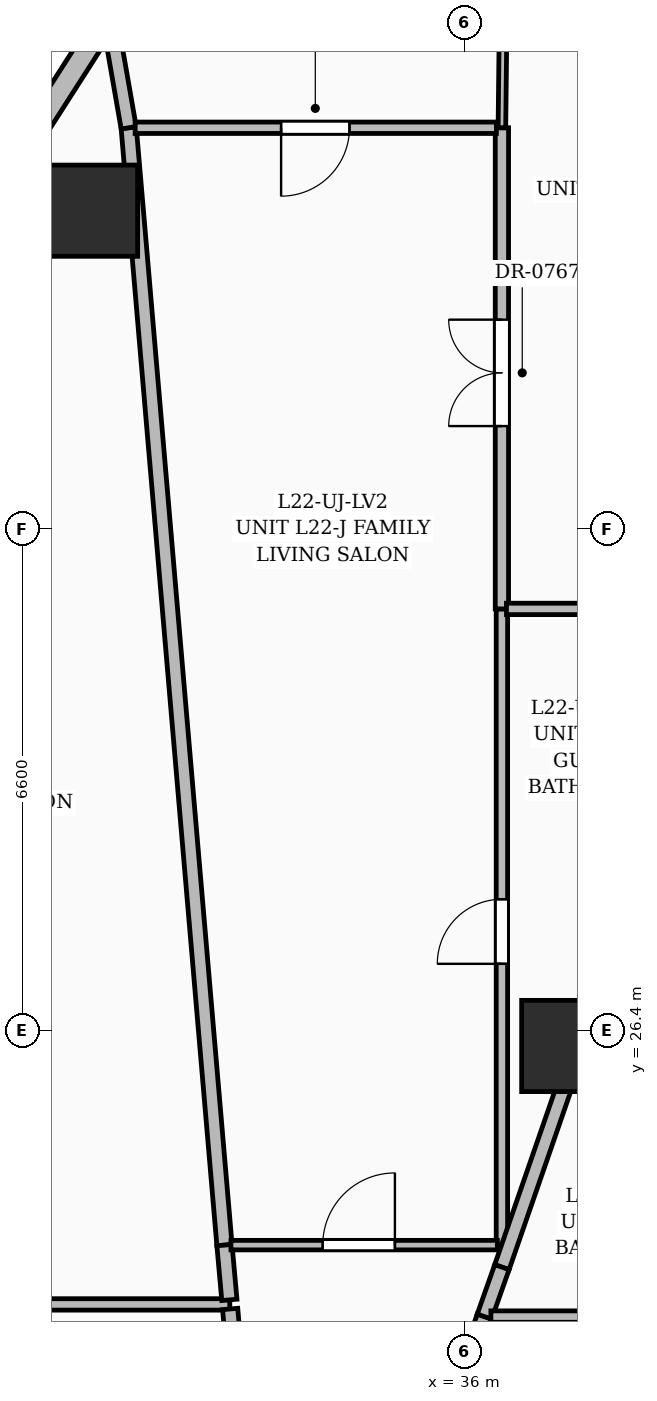
"""IFC4 building model, lengths in metres.
Left out: names, types, materials, properties, quantities, classifications, styles, units other than length and angle.
Written with IfcOpenShell. Run it as: python <this file> out.ifc"""

import sys

from ifc_helpers import new_model, si_unit, direction, frame, frame_2d, origin, origin_2d, place, context, subcontext, project, spatial, rectangle, extrude, element, fill, save


model = new_model("IFC4")
c1 = context("Model", 3, precision=1e-05, world=origin(), true_north=direction((0.0, 1.0)))
c2 = subcontext(c1, "Body", "Model", "MODEL_VIEW")
j1 = project(units=[si_unit("LENGTHUNIT", "METRE"), si_unit("PLANEANGLEUNIT", "RADIAN")], contexts=[c1])
p1 = place(None, origin())
s1 = spatial("IfcSite", under=j1, at=p1, CompositionType="ELEMENT")
p2 = place(p1, origin())
s2 = spatial("IfcBuilding", under=s1, at=p2, CompositionType="ELEMENT")
p3 = place(p2, frame((0.0, 0.0, 89.4)))
s3 = spatial("IfcBuildingStorey", under=s2, at=p3, CompositionType="ELEMENT", Elevation=89.4)
for number, where, z_axis, x_axis in (
    (1, (37.35, 26.2, 0.0), (0.0, 0.0, 1.0), (1.0, 0.0, 0.0)),
    (2, (31.098, 37.189, 0.0), (0.0, 0.0, 1.0), (1.0, 0.0, 0.0)),
):
    element("IfcColumn", number, at=place(p3, frame(where, z_axis=z_axis, x_axis=x_axis)), inside=s3, PredefinedType="COLUMN", context=c2, shape_type="SweptSolid", body=[
        extrude(rectangle(XDim=1.2, YDim=1.2, at=origin_2d()), origin(), (0.0, 0.0, 1.0), 3.6),
    ])
p4 = place(p3, frame((30.164, 37.954, 0.0), z_axis=(0.0, 0.0, 1.0), x_axis=(0.539473041718, 0.842002872477, 0.0)))
e3 = element("IfcWall", 3, at=p4, inside=s3, PredefinedType="SOLIDWALL", context=c2, shape_type="SweptSolid", body=[
    extrude(rectangle(XDim=6.872, YDim=0.3, at=frame_2d((3.436, 0.0))), origin(), (0.0, 0.0, 1.0), 3.35),
])
p5 = place(p4, frame((2.625, 0.0, 0.6)))
e4 = element("IfcOpeningElement", 4, at=p5, cuts=e3, PredefinedType="OPENING", context=c2, shape_type="SweptSolid", body=[
    extrude(rectangle(XDim=1.8, YDim=2.1, at=frame_2d((0.9, 1.05))), frame((0.0, 0.16, 0.0), z_axis=(0.0, -1.0, 0.0), x_axis=(1.0, 0.0, 0.0)), (0.0, 0.0, 1.0), 0.32),
])
p6 = place(p3, frame((32.91, 22.8, 0.0), z_axis=(0.0, 0.0, 1.0), x_axis=(-1.0, 0.0, 0.0)))
e5 = element("IfcWall", 5, at=p6, inside=s3, PredefinedType="PARTITIONING", context=c2, shape_type="SweptSolid", body=[
    extrude(rectangle(XDim=7.67, YDim=0.15, at=frame_2d((3.835, 0.0))), origin(), (0.0, 0.0, 1.0), 2.345),
])
p7 = place(p6, frame((3.449, 0.0, 0.0)))
e6 = element("IfcOpeningElement", 6, at=p7, cuts=e5, PredefinedType="OPENING", context=c2, shape_type="SweptSolid", body=[
    extrude(rectangle(XDim=0.95, YDim=2.2, at=frame_2d((0.475, 1.1))), frame((0.0, 0.085, 0.0), z_axis=(0.0, -1.0, 0.0), x_axis=(1.0, 0.0, 0.0)), (0.0, 0.0, 1.0), 0.17),
])
p8 = place(p3, frame((33.333, 17.835, 0.0), z_axis=(0.0, 0.0, 1.0), x_axis=(-0.08484696782, 0.996393994388, 0.0)))
e7 = element("IfcWall", 7, at=p8, inside=s3, PredefinedType="PARTITIONING", context=c2, shape_type="SweptSolid", body=[
    extrude(rectangle(XDim=4.923, YDim=0.2, at=frame_2d((2.462, 0.0))), origin(), (0.0, 0.0, 1.0), 2.345),
])
p9 = place(p3, frame((32.84, 23.58, 0.0), z_axis=(0.0, 0.0, 1.0), x_axis=(-0.085402080026, 0.996346568583, 0.0)))
e8 = element("IfcWall", 8, at=p9, inside=s3, PredefinedType="PARTITIONING", context=c2, shape_type="SweptSolid", body=[
    extrude(rectangle(XDim=14.754, YDim=0.2, at=frame_2d((7.377, 0.0))), origin(), (0.0, 0.0, 1.0), 2.345),
])
p10 = place(p3, frame((32.905, 22.86, 0.0), z_axis=(0.0, 0.0, 1.0), x_axis=(-0.089135306775, 0.996019526458, 0.0)))
e9 = element("IfcWall", 9, at=p10, inside=s3, PredefinedType="PARTITIONING", context=c2, shape_type="SweptSolid", body=[
    extrude(rectangle(XDim=0.723, YDim=0.2, at=frame_2d((0.362, 0.0))), origin(), (0.0, 0.0, 1.0), 3.35),
])
p11 = place(p3, frame((31.58, 38.28, 0.0), z_axis=(0.0, 0.0, 1.0), x_axis=(-0.172186828925, 0.985064310563, 0.0)))
e10 = element("IfcWall", 10, at=p11, inside=s3, PredefinedType="PARTITIONING", context=c2, shape_type="SweptSolid", body=[
    extrude(rectangle(XDim=1.255, YDim=0.2, at=frame_2d((0.627, 0.0))), origin(), (0.0, 0.0, 1.0), 3.35),
])
p12 = place(p3, frame((36.49, 23.58, 0.0), z_axis=(0.0, 0.0, 1.0), x_axis=(0.0, 1.0, 0.0)))
e11 = element("IfcWall", 11, at=p12, inside=s3, PredefinedType="PARTITIONING", context=c2, shape_type="SweptSolid", body=[
    extrude(rectangle(XDim=8.37, YDim=0.15, at=frame_2d((4.185, 0.0))), origin(), (0.0, 0.0, 1.0), 2.309),
])
p13 = place(p12, frame((3.701, 0.0, 0.0)))
e12 = element("IfcOpeningElement", 12, at=p13, cuts=e11, PredefinedType="OPENING", context=c2, shape_type="SweptSolid", body=[
    extrude(rectangle(XDim=0.85, YDim=2.1, at=frame_2d((0.425, 1.05))), frame((0.0, 0.085, 0.0), z_axis=(0.0, -1.0, 0.0), x_axis=(1.0, 0.0, 0.0)), (0.0, 0.0, 1.0), 0.17),
])
p14 = place(p3, frame((32.925, 23.58, 0.0), z_axis=(0.0, 0.0, 1.0), x_axis=(1.0, 0.0, 0.0)))
e13 = element("IfcWall", 13, at=p14, inside=s3, PredefinedType="PARTITIONING", context=c2, shape_type="SweptSolid", body=[
    extrude(rectangle(XDim=3.505, YDim=0.125, at=frame_2d((1.752, 0.0))), origin(), (0.0, 0.0, 1.0), 2.309),
])
p15 = place(p14, frame((1.208, 0.0, 0.0)))
e14 = element("IfcOpeningElement", 14, at=p15, cuts=e13, PredefinedType="OPENING", context=c2, shape_type="SweptSolid", body=[
    extrude(rectangle(XDim=0.95, YDim=2.2, at=frame_2d((0.475, 1.1))), frame((0.0, 0.072, 0.0), z_axis=(0.0, -1.0, 0.0), x_axis=(1.0, 0.0, 0.0)), (0.0, 0.0, 1.0), 0.145),
])
p16 = place(p3, frame((36.49, 31.95, 0.0), z_axis=(0.0, 0.0, 1.0), x_axis=(0.0, 1.0, 0.0)))
e15 = element("IfcWall", 15, at=p16, inside=s3, PredefinedType="PARTITIONING", context=c2, shape_type="SweptSolid", body=[
    extrude(rectangle(XDim=6.33, YDim=0.175, at=frame_2d((3.165, 0.0))), origin(), (0.0, 0.0, 1.0), 2.37),
])
p17 = place(p16, frame((2.406, 0.0, 0.0)))
e16 = element("IfcOpeningElement", 16, at=p17, cuts=e15, PredefinedType="OPENING", context=c2, shape_type="SweptSolid", body=[
    extrude(rectangle(XDim=1.4, YDim=2.2, at=frame_2d((0.7, 1.1))), frame((0.0, 0.097, 0.0), z_axis=(0.0, -1.0, 0.0), x_axis=(1.0, 0.0, 0.0)), (0.0, 0.0, 1.0), 0.195),
])
p18 = place(p3, frame((36.417, 38.28, 0.0), z_axis=(0.0, 0.0, 1.0), x_axis=(-1.0, 0.0, 0.0)))
e17 = element("IfcWall", 17, at=p18, inside=s3, PredefinedType="PARTITIONING", context=c2, shape_type="SweptSolid", body=[
    extrude(rectangle(XDim=4.752, YDim=0.15, at=frame_2d((2.376, 0.0))), origin(), (0.0, 0.0, 1.0), 3.35),
])
p19 = place(p18, frame((1.933, 0.0, 0.0)))
e18 = element("IfcOpeningElement", 18, at=p19, cuts=e17, PredefinedType="OPENING", context=c2, shape_type="SweptSolid", body=[
    extrude(rectangle(XDim=0.9, YDim=2.15, at=frame_2d((0.45, 1.075))), frame((0.0, 0.085, 0.0), z_axis=(0.0, -1.0, 0.0), x_axis=(1.0, 0.0, 0.0)), (0.0, 0.0, 1.0), 0.17),
])
p20 = place(p3, frame((39.49, 31.95, 0.0), z_axis=(0.0, 0.0, 1.0), x_axis=(-1.0, 0.0, 0.0)))
e19 = element("IfcWall", 19, at=p20, inside=s3, PredefinedType="PARTITIONING", context=c2, shape_type="SweptSolid", body=[
    extrude(rectangle(XDim=2.94, YDim=0.15, at=frame_2d((1.47, 0.0))), origin(), (0.0, 0.0, 1.0), 3.35),
])
p21 = place(p20, frame((1.075, 0.0, 0.0)))
e20 = element("IfcOpeningElement", 20, at=p21, cuts=e19, PredefinedType="OPENING", context=c2, shape_type="SweptSolid", body=[
    extrude(rectangle(XDim=0.85, YDim=2.1, at=frame_2d((0.425, 1.05))), frame((0.0, 0.085, 0.0), z_axis=(0.0, -1.0, 0.0), x_axis=(1.0, 0.0, 0.0)), (0.0, 0.0, 1.0), 0.17),
])
p22 = place(p3, frame((36.49, 23.29, 0.0), z_axis=(0.0, 0.0, 1.0), x_axis=(0.326948466607, 0.945042168468, 0.0)))
e21 = element("IfcWall", 21, at=p22, inside=s3, PredefinedType="PARTITIONING", context=c2, shape_type="SweptSolid", body=[
    extrude(rectangle(XDim=8.381, YDim=0.2, at=frame_2d((4.19, 0.0))), origin(), (0.0, 0.0, 1.0), 2.309),
])
p23 = place(p3, frame((34.598, 17.83, 0.0), z_axis=(0.0, 0.0, 1.0), x_axis=(0.326629354312, 0.945152508806, 0.0)))
e22 = element("IfcWall", 22, at=p23, inside=s3, PredefinedType="PARTITIONING", context=c2, shape_type="SweptSolid", body=[
    extrude(rectangle(XDim=5.089, YDim=0.2, at=frame_2d((2.544, 0.0))), origin(), (0.0, 0.0, 1.0), 3.35),
])
p24 = place(p23, frame((1.943, 0.0, 0.0)))
e23 = element("IfcOpeningElement", 23, at=p24, cuts=e22, PredefinedType="OPENING", context=c2, shape_type="SweptSolid", body=[
    extrude(rectangle(XDim=1.0, YDim=2.2, at=frame_2d((0.5, 1.1))), frame((0.0, 0.11, 0.0), z_axis=(0.0, -1.0, 0.0), x_axis=(1.0, 0.0, 0.0)), (0.0, 0.0, 1.0), 0.22),
])
p25 = place(p3, frame((36.26, 22.64, 0.0), z_axis=(0.0, 0.0, 1.0), x_axis=(0.333486681142, 0.942754810914, 0.0)))
e24 = element("IfcWall", 24, at=p25, inside=s3, PredefinedType="PARTITIONING", context=c2, shape_type="SweptSolid", body=[
    extrude(rectangle(XDim=0.69, YDim=0.2, at=frame_2d((0.345, 0.0))), origin(), (0.0, 0.0, 1.0), 3.35),
])
p26 = place(p3, frame((36.523, 41.154, 0.0), z_axis=(0.0, 0.0, 1.0), x_axis=(-0.011467135897, -0.999934250236, 0.0)))
e25 = element("IfcWall", 25, at=p26, inside=s3, PredefinedType="PARTITIONING", context=c2, shape_type="SweptSolid", body=[
    extrude(rectangle(XDim=2.874, YDim=0.1, at=frame_2d((1.437, 0.0))), origin(), (0.0, 0.0, 1.0), 3.35),
])
p27 = place(p26, frame((0.878, 0.0, 0.0)))
e26 = element("IfcOpeningElement", 26, at=p27, cuts=e25, PredefinedType="OPENING", context=c2, shape_type="SweptSolid", body=[
    extrude(rectangle(XDim=0.9, YDim=2.15, at=frame_2d((0.45, 1.075))), frame((0.0, 0.06, 0.0), z_axis=(0.0, -1.0, 0.0), x_axis=(1.0, 0.0, 0.0)), (0.0, 0.0, 1.0), 0.12),
])
p28 = place(p3, frame((39.17, 22.64, 0.0), z_axis=(0.0, 0.0, 1.0), x_axis=(-1.0, 0.0, 0.0)))
e27 = element("IfcWall", 27, at=p28, inside=s3, PredefinedType="PARTITIONING", context=c2, shape_type="SweptSolid", body=[
    extrude(rectangle(XDim=2.825, YDim=0.15, at=frame_2d((1.413, 0.0))), origin(), (0.0, 0.0, 1.0), 3.35),
])
p29 = place(p15, origin())
e28 = element("IfcDoor", 28, at=p29, inside=s3, OperationType="SINGLE_SWING_RIGHT", PredefinedType="DOOR", context=c2, shape_type="SweptSolid", body=[
    extrude(rectangle(XDim=0.95, YDim=2.2, at=frame_2d((0.475, 1.1))), frame((0.0, 0.025, 0.0), z_axis=(0.0, -1.0, 0.0), x_axis=(1.0, 0.0, 0.0)), (0.0, 0.0, 1.0), 0.05),
])
fill(e14, e28)
p30 = place(p13, origin())
e29 = element("IfcDoor", 29, at=p30, inside=s3, OperationType="SINGLE_SWING_LEFT", PredefinedType="DOOR", context=c2, shape_type="SweptSolid", body=[
    extrude(rectangle(XDim=0.85, YDim=2.1, at=frame_2d((0.425, 1.05))), frame((0.0, 0.025, 0.0), z_axis=(0.0, -1.0, 0.0), x_axis=(1.0, 0.0, 0.0)), (0.0, 0.0, 1.0), 0.05),
])
fill(e12, e29)
p31 = place(p19, origin())
e30 = element("IfcDoor", 30, at=p31, inside=s3, OperationType="SINGLE_SWING_RIGHT", PredefinedType="DOOR", context=c2, shape_type="SweptSolid", body=[
    extrude(rectangle(XDim=0.9, YDim=2.15, at=frame_2d((0.45, 1.075))), frame((0.0, 0.025, 0.0), z_axis=(0.0, -1.0, 0.0), x_axis=(1.0, 0.0, 0.0)), (0.0, 0.0, 1.0), 0.05),
])
fill(e18, e30)
p32 = place(p17, origin())
e31 = element("IfcDoor", 31, at=p32, inside=s3, OperationType="DOUBLE_DOOR_SINGLE_SWING", PredefinedType="DOOR", context=c2, shape_type="SweptSolid", body=[
    extrude(rectangle(XDim=1.4, YDim=2.2, at=frame_2d((0.7, 1.1))), frame((0.0, 0.025, 0.0), z_axis=(0.0, -1.0, 0.0), x_axis=(1.0, 0.0, 0.0)), (0.0, 0.0, 1.0), 0.05),
])
fill(e16, e31)
save(model, sys.argv[1])
